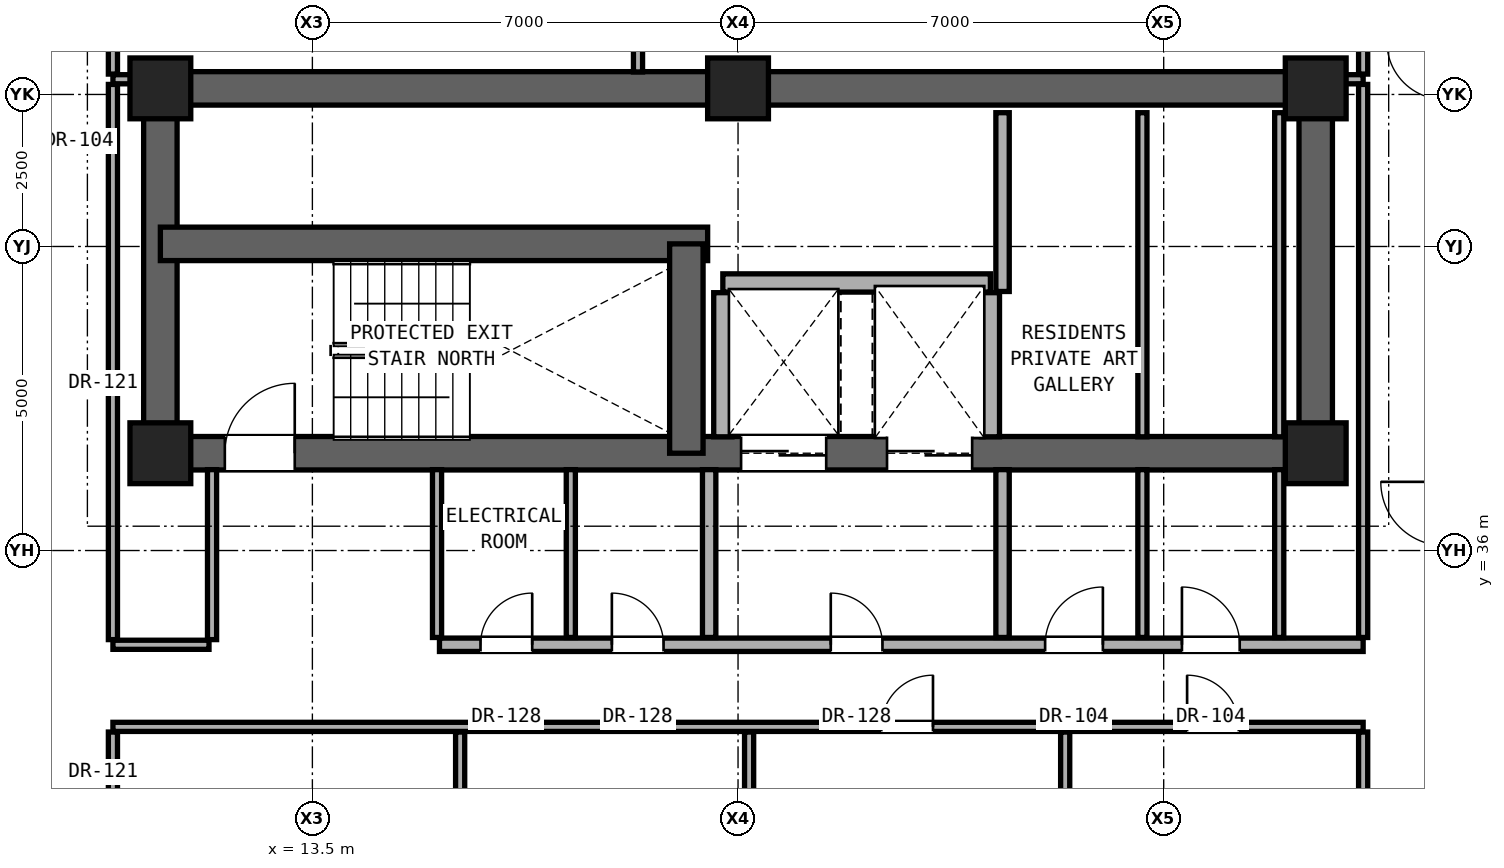
"""IFC4 building model, lengths in metres.
Left out: names, types, materials, properties, quantities, classifications, styles, units other than length and angle.
Written with IfcOpenShell. Run it as: python <this file> out.ifc"""

import sys

from ifc_helpers import new_model, si_unit, direction, frame, frame_2d, origin, origin_2d, place, context, subcontext, project, spatial, rectangle, extrude, element, fill, save


model = new_model("IFC4")
c1 = context("Model", 3, precision=1e-05, world=origin(), true_north=direction((0.0, 1.0)))
c2 = subcontext(c1, "Body", "Model", "MODEL_VIEW")
j1 = project(units=[si_unit("LENGTHUNIT", "METRE"), si_unit("PLANEANGLEUNIT", "RADIAN")], contexts=[c1])
p1 = place(None, origin())
s1 = spatial("IfcSite", under=j1, at=p1, CompositionType="ELEMENT")
p2 = place(p1, origin())
s2 = spatial("IfcBuilding", under=s1, at=p2, CompositionType="ELEMENT")
p3 = place(p2, frame((0.0, 0.0, 164.15)))
s3 = spatial("IfcBuildingStorey", under=s2, at=p3, CompositionType="ELEMENT", Elevation=164.15)
for number, where, z_axis, x_axis in (
    (1, (11.0, 37.6, 0.0), (0.0, 0.0, 1.0), (1.0, 0.0, 0.0)),
    (2, (30.0, 37.6, 0.0), (0.0, 0.0, 1.0), (1.0, 0.0, 0.0)),
    (3, (11.0, 43.6, 0.0), (0.0, 0.0, 1.0), (1.0, 0.0, 0.0)),
    (4, (20.5, 43.6, 0.0), (0.0, 0.0, 1.0), (1.0, 0.0, 0.0)),
    (5, (30.0, 43.6, 0.0), (0.0, 0.0, 1.0), (1.0, 0.0, 0.0)),
):
    element("IfcColumn", number, at=place(p3, frame(where, z_axis=z_axis, x_axis=x_axis)), inside=s3, PredefinedType="COLUMN", context=c2, shape_type="SweptSolid", body=[
        extrude(rectangle(XDim=1.0, YDim=1.0, at=origin_2d()), origin(), (0.0, 0.0, 1.0), 3.25),
    ])
p4 = place(p3, frame((11.0, 43.6, 0.0), z_axis=(0.0, 0.0, 1.0), x_axis=(1.0, 0.0, 0.0)))
e6 = element("IfcWall", 6, at=p4, inside=s3, PredefinedType="SHEAR", context=c2, shape_type="SweptSolid", body=[
    extrude(rectangle(XDim=19.0, YDim=0.55, at=frame_2d((9.5, 0.0))), origin(), (0.0, 0.0, 1.0), 3.05),
])
for number, where, z_axis, x_axis in (
    (7, (11.0, 37.6, 0.0), (0.0, 0.0, 1.0), (0.0, 1.0, 0.0)),
    (8, (30.0, 37.6, 0.0), (0.0, 0.0, 1.0), (0.0, 1.0, 0.0)),
):
    element("IfcWall", number, at=place(p3, frame(where, z_axis=z_axis, x_axis=x_axis)), inside=s3, PredefinedType="SHEAR", context=c2, shape_type="SweptSolid", body=[
        extrude(rectangle(XDim=6.0, YDim=0.55, at=frame_2d((3.0, 0.0))), origin(), (0.0, 0.0, 1.0), 3.05),
    ])
p5 = place(p3, frame((11.0, 37.6, 0.0), z_axis=(0.0, 0.0, 1.0), x_axis=(1.0, 0.0, 0.0)))
e9 = element("IfcWall", 9, at=p5, inside=s3, PredefinedType="SHEAR", context=c2, shape_type="SweptSolid", body=[
    extrude(rectangle(XDim=19.0, YDim=0.55, at=frame_2d((9.5, 0.0))), origin(), (0.0, 0.0, 1.0), 3.05),
])
p6 = place(p5, frame((1.06, 0.0, 0.0)))
e10 = element("IfcOpeningElement", 10, at=p6, cuts=e9, PredefinedType="OPENING", context=c2, shape_type="SweptSolid", body=[
    extrude(rectangle(XDim=1.15, YDim=2.2, at=frame_2d((0.575, 1.1))), frame((0.0, 0.285, 0.0), z_axis=(0.0, -1.0, 0.0), x_axis=(1.0, 0.0, 0.0)), (0.0, 0.0, 1.0), 0.57),
])
p7 = place(p5, frame((9.55, 0.0, 0.0)))
e11 = element("IfcOpeningElement", 11, at=p7, cuts=e9, PredefinedType="OPENING", context=c2, shape_type="SweptSolid", body=[
    extrude(rectangle(XDim=1.4, YDim=2.35, at=frame_2d((0.7, 1.175))), frame((0.0, 0.285, 0.0), z_axis=(0.0, -1.0, 0.0), x_axis=(1.0, 0.0, 0.0)), (0.0, 0.0, 1.0), 0.57),
])
p8 = place(p5, frame((11.95, 0.0, 0.0)))
e12 = element("IfcOpeningElement", 12, at=p8, cuts=e9, PredefinedType="OPENING", context=c2, shape_type="SweptSolid", body=[
    extrude(rectangle(XDim=1.4, YDim=2.35, at=frame_2d((0.7, 1.175))), frame((0.0, 0.285, 0.0), z_axis=(0.0, -1.0, 0.0), x_axis=(1.0, 0.0, 0.0)), (0.0, 0.0, 1.0), 0.57),
])
p9 = place(p3, frame((11.0, 41.043, 0.0), z_axis=(0.0, 0.0, 1.0), x_axis=(1.0, 0.0, 0.0)))
e13 = element("IfcWall", 13, at=p9, inside=s3, PredefinedType="SHEAR", context=c2, shape_type="SweptSolid", body=[
    extrude(rectangle(XDim=9.0, YDim=0.55, at=frame_2d((4.5, 0.0))), origin(), (0.0, 0.0, 1.0), 3.05),
])
p10 = place(p3, frame((19.65, 37.6, 0.0), z_axis=(0.0, 0.0, 1.0), x_axis=(0.0, 1.0, 0.0)))
e14 = element("IfcWall", 14, at=p10, inside=s3, PredefinedType="SHEAR", context=c2, shape_type="SweptSolid", body=[
    extrude(rectangle(XDim=3.443, YDim=0.55, at=frame_2d((1.721, 0.0))), origin(), (0.0, 0.0, 1.0), 3.05),
])
p11 = place(p3, frame((10.22, 33.1, 0.0), z_axis=(0.0, 0.0, 1.0), x_axis=(1.0, 0.0, 0.0)))
e15 = element("IfcWall", 15, at=p11, inside=s3, PredefinedType="PARTITIONING", context=c2, shape_type="SweptSolid", body=[
    extrude(rectangle(XDim=20.56, YDim=0.15, at=frame_2d((10.28, 0.0))), origin(), (0.0, 0.0, 1.0), 2.186),
])
p12 = place(p11, frame((12.636, 0.0, 0.0)))
e16 = element("IfcOpeningElement", 16, at=p12, cuts=e15, PredefinedType="OPENING", context=c2, shape_type="SweptSolid", body=[
    extrude(rectangle(XDim=0.85, YDim=2.01, at=frame_2d((0.425, 1.005))), frame((0.0, 0.085, 0.0), z_axis=(0.0, -1.0, 0.0), x_axis=(1.0, 0.0, 0.0)), (0.0, 0.0, 1.0), 0.17),
])
p13 = place(p11, frame((17.665, 0.0, 0.0)))
e17 = element("IfcOpeningElement", 17, at=p13, cuts=e15, PredefinedType="OPENING", context=c2, shape_type="SweptSolid", body=[
    extrude(rectangle(XDim=0.85, YDim=2.01, at=frame_2d((0.425, 1.005))), frame((0.0, 0.085, 0.0), z_axis=(0.0, -1.0, 0.0), x_axis=(1.0, 0.0, 0.0)), (0.0, 0.0, 1.0), 0.17),
])
p14 = place(p3, frame((10.22, 34.45, 0.0), z_axis=(0.0, 0.0, 1.0), x_axis=(1.0, 0.0, 0.0)))
e18 = element("IfcWall", 18, at=p14, inside=s3, PredefinedType="PARTITIONING", context=c2, shape_type="SweptSolid", body=[
    extrude(rectangle(XDim=1.58, YDim=0.15, at=frame_2d((0.79, 0.0))), origin(), (0.0, 0.0, 1.0), 2.186),
])
p15 = place(p3, frame((15.59, 34.45, 0.0), z_axis=(0.0, 0.0, 1.0), x_axis=(1.0, 0.0, 0.0)))
e19 = element("IfcWall", 19, at=p15, inside=s3, PredefinedType="SOLIDWALL", context=c2, shape_type="SweptSolid", body=[
    extrude(rectangle(XDim=15.19, YDim=0.22, at=frame_2d((7.595, 0.0))), origin(), (0.0, 0.0, 1.0), 2.186),
])
p16 = place(p15, frame((6.435, 0.0, 0.0)))
e20 = element("IfcOpeningElement", 20, at=p16, cuts=e19, PredefinedType="OPENING", context=c2, shape_type="SweptSolid", body=[
    extrude(rectangle(XDim=0.85, YDim=2.01, at=frame_2d((0.425, 1.005))), frame((0.0, 0.12, 0.0), z_axis=(0.0, -1.0, 0.0), x_axis=(1.0, 0.0, 0.0)), (0.0, 0.0, 1.0), 0.24),
])
p17 = place(p15, frame((9.96, 0.0, 0.0)))
e21 = element("IfcOpeningElement", 21, at=p17, cuts=e19, PredefinedType="OPENING", context=c2, shape_type="SweptSolid", body=[
    extrude(rectangle(XDim=0.95, YDim=2.15, at=frame_2d((0.475, 1.075))), frame((0.0, 0.12, 0.0), z_axis=(0.0, -1.0, 0.0), x_axis=(1.0, 0.0, 0.0)), (0.0, 0.0, 1.0), 0.24),
])
p18 = place(p15, frame((12.21, 0.0, 0.0)))
e22 = element("IfcOpeningElement", 22, at=p18, cuts=e19, PredefinedType="OPENING", context=c2, shape_type="SweptSolid", body=[
    extrude(rectangle(XDim=0.95, YDim=2.15, at=frame_2d((0.475, 1.075))), frame((0.0, 0.12, 0.0), z_axis=(0.0, -1.0, 0.0), x_axis=(1.0, 0.0, 0.0)), (0.0, 0.0, 1.0), 0.24),
])
p19 = place(p15, frame((0.675, 0.0, 0.0)))
e23 = element("IfcOpeningElement", 23, at=p19, cuts=e19, PredefinedType="OPENING", context=c2, shape_type="SweptSolid", body=[
    extrude(rectangle(XDim=0.85, YDim=2.01, at=frame_2d((0.425, 1.005))), frame((0.0, 0.12, 0.0), z_axis=(0.0, -1.0, 0.0), x_axis=(1.0, 0.0, 0.0)), (0.0, 0.0, 1.0), 0.24),
])
p20 = place(p15, frame((2.835, 0.0, 0.0)))
e24 = element("IfcOpeningElement", 24, at=p20, cuts=e19, PredefinedType="OPENING", context=c2, shape_type="SweptSolid", body=[
    extrude(rectangle(XDim=0.85, YDim=2.01, at=frame_2d((0.425, 1.005))), frame((0.0, 0.12, 0.0), z_axis=(0.0, -1.0, 0.0), x_axis=(1.0, 0.0, 0.0)), (0.0, 0.0, 1.0), 0.24),
])
p21 = place(p3, frame((20.25, 40.4, 0.0), z_axis=(0.0, 0.0, 1.0), x_axis=(1.0, 0.0, 0.0)))
e25 = element("IfcWall", 25, at=p21, inside=s3, PredefinedType="SOLIDWALL", context=c2, shape_type="SweptSolid", body=[
    extrude(rectangle(XDim=4.4, YDim=0.3, at=frame_2d((2.2, 0.0))), origin(), (0.0, 0.0, 1.0), 3.05),
])
for number, where, z_axis, x_axis in (
    (26, (10.22, 43.75, 0.0), (0.0, 0.0, 1.0), (1.0, 0.0, 0.0)),
    (27, (30.27, 43.75, 0.0), (0.0, 0.0, 1.0), (1.0, 0.0, 0.0)),
):
    element("IfcWall", number, at=place(p3, frame(where, z_axis=z_axis, x_axis=x_axis)), inside=s3, PredefinedType="PARTITIONING", context=c2, shape_type="SweptSolid", body=[
        extrude(rectangle(XDim=0.51, YDim=0.15, at=frame_2d((0.255, 0.0))), origin(), (0.0, 0.0, 1.0), 3.05),
    ])
p22 = place(p3, frame((10.22, 22.935, 0.0), z_axis=(0.0, 0.0, 1.0), x_axis=(0.0, 1.0, 0.0)))
e28 = element("IfcWall", 28, at=p22, inside=s3, PredefinedType="PARTITIONING", context=c2, shape_type="SweptSolid", body=[
    extrude(rectangle(XDim=10.08, YDim=0.15, at=frame_2d((5.04, 0.0))), origin(), (0.0, 0.0, 1.0), 2.346),
])
p23 = place(p22, frame((4.565, 0.0, 0.0)))
e29 = element("IfcOpeningElement", 29, at=p23, cuts=e28, PredefinedType="OPENING", context=c2, shape_type="SweptSolid", body=[
    extrude(rectangle(XDim=0.95, YDim=2.15, at=frame_2d((0.475, 1.075))), frame((0.0, 0.085, 0.0), z_axis=(0.0, -1.0, 0.0), x_axis=(1.0, 0.0, 0.0)), (0.0, 0.0, 1.0), 0.17),
])
p24 = place(p3, frame((10.22, 34.535, 0.0), z_axis=(0.0, 0.0, 1.0), x_axis=(0.0, 1.0, 0.0)))
e30 = element("IfcWall", 30, at=p24, inside=s3, PredefinedType="PARTITIONING", context=c2, shape_type="SweptSolid", body=[
    extrude(rectangle(XDim=9.13, YDim=0.15, at=frame_2d((4.565, 0.0))), origin(), (0.0, 0.0, 1.0), 2.442),
])
p25 = place(p3, frame((10.22, 43.835, 0.0), z_axis=(0.0, 0.0, 1.0), x_axis=(0.0, 1.0, 0.0)))
e31 = element("IfcWall", 31, at=p25, inside=s3, PredefinedType="PARTITIONING", context=c2, shape_type="SweptSolid", body=[
    extrude(rectangle(XDim=2.629, YDim=0.15, at=frame_2d((1.314, 0.0))), origin(), (0.0, 0.0, 1.0), 3.05),
])
p26 = place(p25, frame((0.79, 0.0, 0.0)))
e32 = element("IfcOpeningElement", 32, at=p26, cuts=e31, PredefinedType="OPENING", context=c2, shape_type="SweptSolid", body=[
    extrude(rectangle(XDim=1.05, YDim=2.2, at=frame_2d((0.525, 1.1))), frame((0.0, 0.085, 0.0), z_axis=(0.0, -1.0, 0.0), x_axis=(1.0, 0.0, 0.0)), (0.0, 0.0, 1.0), 0.17),
])
p27 = place(p3, frame((11.85, 34.535, 0.0), z_axis=(0.0, 0.0, 1.0), x_axis=(0.0, 1.0, 0.0)))
e33 = element("IfcWall", 33, at=p27, inside=s3, PredefinedType="PARTITIONING", context=c2, shape_type="SweptSolid", body=[
    extrude(rectangle(XDim=2.795, YDim=0.15, at=frame_2d((1.397, 0.0))), origin(), (0.0, 0.0, 1.0), 3.05),
])
p28 = place(p3, frame((15.55, 34.57, 0.0), z_axis=(0.0, 0.0, 1.0), x_axis=(0.0, 1.0, 0.0)))
e34 = element("IfcWall", 34, at=p28, inside=s3, PredefinedType="PARTITIONING", context=c2, shape_type="SweptSolid", body=[
    extrude(rectangle(XDim=2.76, YDim=0.15, at=frame_2d((1.38, 0.0))), origin(), (0.0, 0.0, 1.0), 3.05),
])
p29 = place(p3, frame((15.93, 22.935, 0.0), z_axis=(0.0, 0.0, 1.0), x_axis=(0.0, 1.0, 0.0)))
e35 = element("IfcWall", 35, at=p29, inside=s3, PredefinedType="PARTITIONING", context=c2, shape_type="SweptSolid", body=[
    extrude(rectangle(XDim=10.08, YDim=0.15, at=frame_2d((5.04, 0.0))), origin(), (0.0, 0.0, 1.0), 2.186),
])
p30 = place(p3, frame((17.75, 34.57, 0.0), z_axis=(0.0, 0.0, 1.0), x_axis=(0.0, 1.0, 0.0)))
e36 = element("IfcWall", 36, at=p30, inside=s3, PredefinedType="PARTITIONING", context=c2, shape_type="SweptSolid", body=[
    extrude(rectangle(XDim=2.76, YDim=0.15, at=frame_2d((1.38, 0.0))), origin(), (0.0, 0.0, 1.0), 3.05),
])
p31 = place(p3, frame((18.855, 43.87, 0.0), z_axis=(0.0, 0.0, 1.0), x_axis=(0.0, 1.0, 0.0)))
e37 = element("IfcWall", 37, at=p31, inside=s3, PredefinedType="PARTITIONING", context=c2, shape_type="SweptSolid", body=[
    extrude(rectangle(XDim=2.594, YDim=0.15, at=frame_2d((1.297, 0.0))), origin(), (0.0, 0.0, 1.0), 3.05),
])
p32 = place(p3, frame((20.025, 34.57, 0.0), z_axis=(0.0, 0.0, 1.0), x_axis=(0.0, 1.0, 0.0)))
e38 = element("IfcWall", 38, at=p32, inside=s3, PredefinedType="SOLIDWALL", context=c2, shape_type="SweptSolid", body=[
    extrude(rectangle(XDim=2.76, YDim=0.22, at=frame_2d((1.38, 0.0))), origin(), (0.0, 0.0, 1.0), 3.05),
])
p33 = place(p3, frame((20.25, 37.87, 0.0), z_axis=(0.0, 0.0, 1.0), x_axis=(0.0, 1.0, 0.0)))
e39 = element("IfcWall", 39, at=p33, inside=s3, PredefinedType="SOLIDWALL", context=c2, shape_type="SweptSolid", body=[
    extrude(rectangle(XDim=2.37, YDim=0.3, at=frame_2d((1.185, 0.0))), origin(), (0.0, 0.0, 1.0), 3.05),
])
p34 = place(p3, frame((20.682, 19.985, 0.0), z_axis=(0.0, 0.0, 1.0), x_axis=(0.0, 1.0, 0.0)))
e40 = element("IfcWall", 40, at=p34, inside=s3, PredefinedType="PARTITIONING", context=c2, shape_type="SweptSolid", body=[
    extrude(rectangle(XDim=13.03, YDim=0.15, at=frame_2d((6.515, 0.0))), origin(), (0.0, 0.0, 1.0), 2.186),
])
p35 = place(p3, frame((24.65, 37.87, 0.0), z_axis=(0.0, 0.0, 1.0), x_axis=(0.0, 1.0, 0.0)))
e41 = element("IfcWall", 41, at=p35, inside=s3, PredefinedType="SOLIDWALL", context=c2, shape_type="SweptSolid", body=[
    extrude(rectangle(XDim=2.37, YDim=0.3, at=frame_2d((1.185, 0.0))), origin(), (0.0, 0.0, 1.0), 3.05),
])
p36 = place(p3, frame((24.85, 34.57, 0.0), z_axis=(0.0, 0.0, 1.0), x_axis=(0.0, 1.0, 0.0)))
e42 = element("IfcWall", 42, at=p36, inside=s3, PredefinedType="SOLIDWALL", context=c2, shape_type="SweptSolid", body=[
    extrude(rectangle(XDim=2.76, YDim=0.22, at=frame_2d((1.38, 0.0))), origin(), (0.0, 0.0, 1.0), 3.05),
])
p37 = place(p3, frame((24.85, 40.26, 0.0), z_axis=(0.0, 0.0, 1.0), x_axis=(0.0, 1.0, 0.0)))
e43 = element("IfcWall", 43, at=p37, inside=s3, PredefinedType="SOLIDWALL", context=c2, shape_type="SweptSolid", body=[
    extrude(rectangle(XDim=2.94, YDim=0.22, at=frame_2d((1.47, 0.0))), origin(), (0.0, 0.0, 1.0), 3.05),
])
p38 = place(p3, frame((25.88, 19.985, 0.0), z_axis=(0.0, 0.0, 1.0), x_axis=(0.0, 1.0, 0.0)))
e44 = element("IfcWall", 44, at=p38, inside=s3, PredefinedType="PARTITIONING", context=c2, shape_type="SweptSolid", body=[
    extrude(rectangle(XDim=13.03, YDim=0.15, at=frame_2d((6.515, 0.0))), origin(), (0.0, 0.0, 1.0), 2.186),
])
p39 = place(p3, frame((27.15, 34.57, 0.0), z_axis=(0.0, 0.0, 1.0), x_axis=(0.0, 1.0, 0.0)))
e45 = element("IfcWall", 45, at=p39, inside=s3, PredefinedType="PARTITIONING", context=c2, shape_type="SweptSolid", body=[
    extrude(rectangle(XDim=2.76, YDim=0.15, at=frame_2d((1.38, 0.0))), origin(), (0.0, 0.0, 1.0), 3.05),
])
p40 = place(p3, frame((27.15, 37.87, 0.0), z_axis=(0.0, 0.0, 1.0), x_axis=(0.0, 1.0, 0.0)))
e46 = element("IfcWall", 46, at=p40, inside=s3, PredefinedType="PARTITIONING", context=c2, shape_type="SweptSolid", body=[
    extrude(rectangle(XDim=5.33, YDim=0.15, at=frame_2d((2.665, 0.0))), origin(), (0.0, 0.0, 1.0), 3.05),
])
p41 = place(p3, frame((29.4, 34.57, 0.0), z_axis=(0.0, 0.0, 1.0), x_axis=(0.0, 1.0, 0.0)))
e47 = element("IfcWall", 47, at=p41, inside=s3, PredefinedType="PARTITIONING", context=c2, shape_type="SweptSolid", body=[
    extrude(rectangle(XDim=2.76, YDim=0.15, at=frame_2d((1.38, 0.0))), origin(), (0.0, 0.0, 1.0), 3.05),
])
p42 = place(p3, frame((29.4, 37.87, 0.0), z_axis=(0.0, 0.0, 1.0), x_axis=(0.0, 1.0, 0.0)))
e48 = element("IfcWall", 48, at=p42, inside=s3, PredefinedType="PARTITIONING", context=c2, shape_type="SweptSolid", body=[
    extrude(rectangle(XDim=5.33, YDim=0.15, at=frame_2d((2.665, 0.0))), origin(), (0.0, 0.0, 1.0), 3.05),
])
p43 = place(p3, frame((30.78, 19.985, 0.0), z_axis=(0.0, 0.0, 1.0), x_axis=(0.0, 1.0, 0.0)))
e49 = element("IfcWall", 49, at=p43, inside=s3, PredefinedType="PARTITIONING", context=c2, shape_type="SweptSolid", body=[
    extrude(rectangle(XDim=13.03, YDim=0.15, at=frame_2d((6.515, 0.0))), origin(), (0.0, 0.0, 1.0), 2.346),
])
p44 = place(p3, frame((30.78, 34.57, 0.0), z_axis=(0.0, 0.0, 1.0), x_axis=(0.0, 1.0, 0.0)))
e50 = element("IfcWall", 50, at=p44, inside=s3, PredefinedType="PARTITIONING", context=c2, shape_type="SweptSolid", body=[
    extrude(rectangle(XDim=9.095, YDim=0.15, at=frame_2d((4.547, 0.0))), origin(), (0.0, 0.0, 1.0), 2.442),
])
p45 = place(p3, frame((30.78, 43.835, 0.0), z_axis=(0.0, 0.0, 1.0), x_axis=(0.0, 1.0, 0.0)))
e51 = element("IfcWall", 51, at=p45, inside=s3, PredefinedType="PARTITIONING", context=c2, shape_type="SweptSolid", body=[
    extrude(rectangle(XDim=2.629, YDim=0.15, at=frame_2d((1.314, 0.0))), origin(), (0.0, 0.0, 1.0), 3.05),
])
p46 = place(p45, frame((0.79, 0.0, 0.0)))
e52 = element("IfcOpeningElement", 52, at=p46, cuts=e51, PredefinedType="OPENING", context=c2, shape_type="SweptSolid", body=[
    extrude(rectangle(XDim=1.05, YDim=2.2, at=frame_2d((0.525, 1.1))), frame((0.0, 0.085, 0.0), z_axis=(0.0, -1.0, 0.0), x_axis=(1.0, 0.0, 0.0)), (0.0, 0.0, 1.0), 0.17),
])
p47 = place(p6, origin())
e53 = element("IfcDoor", 53, at=p47, inside=s3, OperationType="SINGLE_SWING_RIGHT", PredefinedType="DOOR", context=c2, shape_type="SweptSolid", body=[
    extrude(rectangle(XDim=1.15, YDim=2.2, at=frame_2d((0.575, 1.1))), frame((0.0, 0.025, 0.0), z_axis=(0.0, -1.0, 0.0), x_axis=(1.0, 0.0, 0.0)), (0.0, 0.0, 1.0), 0.05),
])
fill(e10, e53)
p48 = place(p16, origin())
e54 = element("IfcDoor", 54, at=p48, inside=s3, OperationType="SINGLE_SWING_LEFT", PredefinedType="DOOR", context=c2, shape_type="SweptSolid", body=[
    extrude(rectangle(XDim=0.85, YDim=2.01, at=frame_2d((0.425, 1.005))), frame((0.0, 0.025, 0.0), z_axis=(0.0, -1.0, 0.0), x_axis=(1.0, 0.0, 0.0)), (0.0, 0.0, 1.0), 0.05),
])
fill(e20, e54)
p49 = place(p17, origin())
e55 = element("IfcDoor", 55, at=p49, inside=s3, OperationType="SINGLE_SWING_RIGHT", PredefinedType="DOOR", context=c2, shape_type="SweptSolid", body=[
    extrude(rectangle(XDim=0.95, YDim=2.15, at=frame_2d((0.475, 1.075))), frame((0.0, 0.025, 0.0), z_axis=(0.0, -1.0, 0.0), x_axis=(1.0, 0.0, 0.0)), (0.0, 0.0, 1.0), 0.05),
])
fill(e21, e55)
p50 = place(p18, origin())
e56 = element("IfcDoor", 56, at=p50, inside=s3, OperationType="SINGLE_SWING_LEFT", PredefinedType="DOOR", context=c2, shape_type="SweptSolid", body=[
    extrude(rectangle(XDim=0.95, YDim=2.15, at=frame_2d((0.475, 1.075))), frame((0.0, 0.025, 0.0), z_axis=(0.0, -1.0, 0.0), x_axis=(1.0, 0.0, 0.0)), (0.0, 0.0, 1.0), 0.05),
])
fill(e22, e56)
p51 = place(p19, origin())
e57 = element("IfcDoor", 57, at=p51, inside=s3, OperationType="SINGLE_SWING_RIGHT", PredefinedType="DOOR", context=c2, shape_type="SweptSolid", body=[
    extrude(rectangle(XDim=0.85, YDim=2.01, at=frame_2d((0.425, 1.005))), frame((0.0, 0.025, 0.0), z_axis=(0.0, -1.0, 0.0), x_axis=(1.0, 0.0, 0.0)), (0.0, 0.0, 1.0), 0.05),
])
fill(e23, e57)
p52 = place(p20, origin())
e58 = element("IfcDoor", 58, at=p52, inside=s3, OperationType="SINGLE_SWING_LEFT", PredefinedType="DOOR", context=c2, shape_type="SweptSolid", body=[
    extrude(rectangle(XDim=0.85, YDim=2.01, at=frame_2d((0.425, 1.005))), frame((0.0, 0.025, 0.0), z_axis=(0.0, -1.0, 0.0), x_axis=(1.0, 0.0, 0.0)), (0.0, 0.0, 1.0), 0.05),
])
fill(e24, e58)
p53 = place(p12, origin())
e59 = element("IfcDoor", 59, at=p53, inside=s3, OperationType="SINGLE_SWING_RIGHT", PredefinedType="DOOR", context=c2, shape_type="SweptSolid", body=[
    extrude(rectangle(XDim=0.85, YDim=2.01, at=frame_2d((0.425, 1.005))), frame((0.0, 0.025, 0.0), z_axis=(0.0, -1.0, 0.0), x_axis=(1.0, 0.0, 0.0)), (0.0, 0.0, 1.0), 0.05),
])
fill(e16, e59)
p54 = place(p13, origin())
e60 = element("IfcDoor", 60, at=p54, inside=s3, OperationType="SINGLE_SWING_LEFT", PredefinedType="DOOR", context=c2, shape_type="SweptSolid", body=[
    extrude(rectangle(XDim=0.85, YDim=2.01, at=frame_2d((0.425, 1.005))), frame((0.0, 0.025, 0.0), z_axis=(0.0, -1.0, 0.0), x_axis=(1.0, 0.0, 0.0)), (0.0, 0.0, 1.0), 0.05),
])
fill(e17, e60)
p55 = place(p7, origin())
e61 = element("IfcDoor", 61, at=p55, inside=s3, OperationType="DOUBLE_DOOR_SLIDING", PredefinedType="DOOR", context=c2, shape_type="SweptSolid", body=[
    extrude(rectangle(XDim=1.4, YDim=2.35, at=frame_2d((0.7, 1.175))), frame((0.0, 0.025, 0.0), z_axis=(0.0, -1.0, 0.0), x_axis=(1.0, 0.0, 0.0)), (0.0, 0.0, 1.0), 0.05),
])
fill(e11, e61)
p56 = place(p8, origin())
e62 = element("IfcDoor", 62, at=p56, inside=s3, OperationType="DOUBLE_DOOR_SLIDING", PredefinedType="DOOR", context=c2, shape_type="SweptSolid", body=[
    extrude(rectangle(XDim=1.4, YDim=2.35, at=frame_2d((0.7, 1.175))), frame((0.0, 0.025, 0.0), z_axis=(0.0, -1.0, 0.0), x_axis=(1.0, 0.0, 0.0)), (0.0, 0.0, 1.0), 0.05),
])
fill(e12, e62)
save(model, sys.argv[1])
